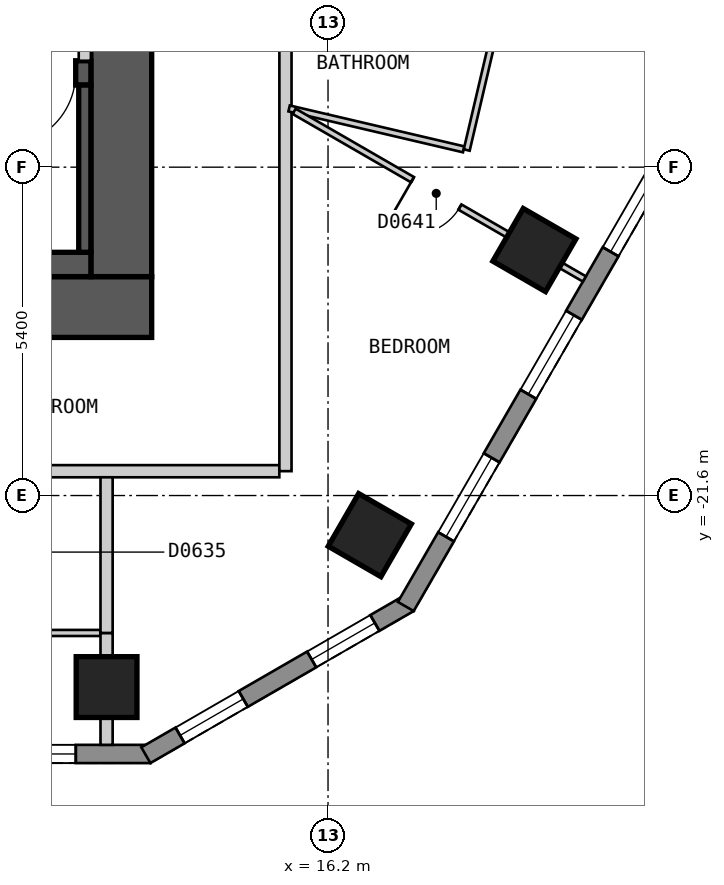
"""IFC4 building model, lengths in metres.
Left out: names, types, materials, properties, quantities, classifications, styles, units other than length and angle.
Written with IfcOpenShell. Run it as: python <this file> out.ifc"""

import sys

from ifc_helpers import new_model, si_unit, direction, frame, frame_2d, origin, origin_2d, place, context, subcontext, project, spatial, polyline, rectangle, outline, extrude, element, fill, save


model = new_model("IFC4")
c1 = context("Model", 3, precision=1e-05, world=origin(), true_north=direction((0.0, 1.0)))
c2 = subcontext(c1, "Body", "Model", "MODEL_VIEW")
j1 = project(units=[si_unit("LENGTHUNIT", "METRE"), si_unit("PLANEANGLEUNIT", "RADIAN")], contexts=[c1])
p1 = place(None, origin())
s1 = spatial("IfcSite", under=j1, at=p1, CompositionType="ELEMENT")
p2 = place(p1, origin())
s2 = spatial("IfcBuilding", under=s1, at=p2, CompositionType="ELEMENT")
p3 = place(p2, frame((0.0, 0.0, 75.0)))
s3 = spatial("IfcBuildingStorey", under=s2, at=p3, CompositionType="ELEMENT", Elevation=75.0)
for number, where, z_axis, x_axis in (
    (1, (12.558, -24.75, 0.0), (0.0, 0.0, 1.0), (1.0, 0.0, 0.0)),
    (2, (16.887, -22.251, 0.0), (0.0, 0.0, 1.0), (0.5, 0.866, 0.0)),
    (3, (19.594, -17.563, 0.0), (0.0, 0.0, 1.0), (0.5, 0.866, 0.0)),
):
    element("IfcColumn", number, at=place(p3, frame(where, z_axis=z_axis, x_axis=x_axis)), inside=s3, PredefinedType="COLUMN", context=c2, shape_type="SweptSolid", body=[
        extrude(rectangle(XDim=1.0, YDim=1.0, at=origin_2d()), origin(), (0.0, 0.0, 1.0), 3.0),
    ])
p4 = place(p3, frame((-13.3, -18.5, 0.0), z_axis=(0.0, 0.0, 1.0), x_axis=(1.0, 0.0, 0.0)))
e4 = element("IfcWall", 4, at=p4, inside=s3, PredefinedType="SHEAR", context=c2, shape_type="SweptSolid", body=[
    extrude(rectangle(XDim=26.6, YDim=1.0, at=frame_2d((13.3, 0.0))), origin(), (0.0, 0.0, 1.0), 2.7),
])
p5 = place(p3, frame((12.8, -18.0, 0.0), z_axis=(0.0, 0.0, 1.0), x_axis=(0.0, 1.0, 0.0)))
e5 = element("IfcWall", 5, at=p5, inside=s3, PredefinedType="SHEAR", context=c2, shape_type="SweptSolid", body=[
    extrude(rectangle(XDim=12.0, YDim=1.0, at=frame_2d((6.0, 0.0))), origin(), (0.0, 0.0, 1.0), 2.7),
])
p6 = place(p3, frame((-12.3, -14.65, 0.0), z_axis=(0.0, 0.0, 1.0), x_axis=(1.0, 0.0, 0.0)))
e6 = element("IfcWall", 6, at=p6, inside=s3, PredefinedType="SHEAR", context=c2, shape_type="SweptSolid", body=[
    extrude(rectangle(XDim=24.6, YDim=0.4, at=frame_2d((12.3, 0.0))), origin(), (0.0, 0.0, 1.0), 2.7),
])
p7 = place(p6, frame((1.5, 0.0, 0.0), z_axis=(0.0, 0.0, 1.0), x_axis=(-1.0, 0.0, 0.0)))
e7 = element("IfcOpeningElement", 7, at=p7, cuts=e6, PredefinedType="OPENING", context=c2, shape_type="SweptSolid", body=[
    extrude(rectangle(XDim=1.2, YDim=2.1, at=frame_2d((0.6, 1.05))), frame((0.0, 0.21, 0.0), z_axis=(0.0, -1.0, 0.0), x_axis=(1.0, 0.0, 0.0)), (0.0, 0.0, 1.0), 0.42),
])
p8 = place(p6, frame((24.35, 0.0, 0.0), z_axis=(0.0, 0.0, 1.0), x_axis=(-1.0, 0.0, 0.0)))
e8 = element("IfcOpeningElement", 8, at=p8, cuts=e6, PredefinedType="OPENING", context=c2, shape_type="SweptSolid", body=[
    extrude(rectangle(XDim=1.2, YDim=2.1, at=frame_2d((0.6, 1.05))), frame((0.0, 0.21, 0.0), z_axis=(0.0, -1.0, 0.0), x_axis=(1.0, 0.0, 0.0)), (0.0, 0.0, 1.0), 0.42),
])
p9 = place(p6, frame((17.4, 0.0, 0.0), z_axis=(0.0, 0.0, 1.0), x_axis=(-1.0, 0.0, 0.0)))
e9 = element("IfcOpeningElement", 9, at=p9, cuts=e6, PredefinedType="OPENING", context=c2, shape_type="SweptSolid", body=[
    extrude(rectangle(XDim=1.0, YDim=2.1, at=frame_2d((0.5, 1.05))), frame((0.0, 0.21, 0.0), z_axis=(0.0, -1.0, 0.0), x_axis=(1.0, 0.0, 0.0)), (0.0, 0.0, 1.0), 0.42),
])
p10 = place(p3, frame((-13.279, -25.85, 0.0), z_axis=(0.0, 0.0, 1.0), x_axis=(1.0, 0.0, 0.0)))
e10 = element("IfcWall", 10, at=p10, inside=s3, PredefinedType="SOLIDWALL", context=c2, shape_type="SweptSolid", body=[
    extrude(outline(polyline([(0.0, -0.15), (26.558, -0.15), (26.478, 0.15), (0.08, 0.15), (0.0, -0.15)])), origin(), (0.0, 0.0, 1.0), 2.7),
])
p11 = place(p10, frame((1.228, 0.0, 0.15)))
e11 = element("IfcOpeningElement", 11, at=p11, cuts=e10, PredefinedType="OPENING", context=c2, shape_type="SweptSolid", body=[
    extrude(rectangle(XDim=1.5, YDim=2.1, at=frame_2d((0.75, 1.05))), frame((0.0, 0.16, 0.0), z_axis=(0.0, -1.0, 0.0), x_axis=(1.0, 0.0, 0.0)), (0.0, 0.0, 1.0), 0.32),
])
p12 = place(p10, frame((3.739, 0.0, 0.15)))
e12 = element("IfcOpeningElement", 12, at=p12, cuts=e10, PredefinedType="OPENING", context=c2, shape_type="SweptSolid", body=[
    extrude(rectangle(XDim=1.5, YDim=2.1, at=frame_2d((0.75, 1.05))), frame((0.0, 0.16, 0.0), z_axis=(0.0, -1.0, 0.0), x_axis=(1.0, 0.0, 0.0)), (0.0, 0.0, 1.0), 0.32),
])
p13 = place(p10, frame((6.251, 0.0, 0.15)))
e13 = element("IfcOpeningElement", 13, at=p13, cuts=e10, PredefinedType="OPENING", context=c2, shape_type="SweptSolid", body=[
    extrude(rectangle(XDim=1.5, YDim=2.1, at=frame_2d((0.75, 1.05))), frame((0.0, 0.16, 0.0), z_axis=(0.0, -1.0, 0.0), x_axis=(1.0, 0.0, 0.0)), (0.0, 0.0, 1.0), 0.32),
])
p14 = place(p10, frame((8.762, 0.0, 0.15)))
e14 = element("IfcOpeningElement", 14, at=p14, cuts=e10, PredefinedType="OPENING", context=c2, shape_type="SweptSolid", body=[
    extrude(rectangle(XDim=1.5, YDim=2.1, at=frame_2d((0.75, 1.05))), frame((0.0, 0.16, 0.0), z_axis=(0.0, -1.0, 0.0), x_axis=(1.0, 0.0, 0.0)), (0.0, 0.0, 1.0), 0.32),
])
p15 = place(p10, frame((11.274, 0.0, 0.15)))
e15 = element("IfcOpeningElement", 15, at=p15, cuts=e10, PredefinedType="OPENING", context=c2, shape_type="SweptSolid", body=[
    extrude(rectangle(XDim=1.5, YDim=2.1, at=frame_2d((0.75, 1.05))), frame((0.0, 0.16, 0.0), z_axis=(0.0, -1.0, 0.0), x_axis=(1.0, 0.0, 0.0)), (0.0, 0.0, 1.0), 0.32),
])
p16 = place(p10, frame((13.785, 0.0, 0.15)))
e16 = element("IfcOpeningElement", 16, at=p16, cuts=e10, PredefinedType="OPENING", context=c2, shape_type="SweptSolid", body=[
    extrude(rectangle(XDim=1.5, YDim=2.1, at=frame_2d((0.75, 1.05))), frame((0.0, 0.16, 0.0), z_axis=(0.0, -1.0, 0.0), x_axis=(1.0, 0.0, 0.0)), (0.0, 0.0, 1.0), 0.32),
])
p17 = place(p10, frame((16.297, 0.0, 0.15)))
e17 = element("IfcOpeningElement", 17, at=p17, cuts=e10, PredefinedType="OPENING", context=c2, shape_type="SweptSolid", body=[
    extrude(rectangle(XDim=1.5, YDim=2.1, at=frame_2d((0.75, 1.05))), frame((0.0, 0.16, 0.0), z_axis=(0.0, -1.0, 0.0), x_axis=(1.0, 0.0, 0.0)), (0.0, 0.0, 1.0), 0.32),
])
p18 = place(p10, frame((18.808, 0.0, 0.15)))
e18 = element("IfcOpeningElement", 18, at=p18, cuts=e10, PredefinedType="OPENING", context=c2, shape_type="SweptSolid", body=[
    extrude(rectangle(XDim=1.5, YDim=2.1, at=frame_2d((0.75, 1.05))), frame((0.0, 0.16, 0.0), z_axis=(0.0, -1.0, 0.0), x_axis=(1.0, 0.0, 0.0)), (0.0, 0.0, 1.0), 0.32),
])
p19 = place(p10, frame((21.32, 0.0, 0.15)))
e19 = element("IfcOpeningElement", 19, at=p19, cuts=e10, PredefinedType="OPENING", context=c2, shape_type="SweptSolid", body=[
    extrude(rectangle(XDim=1.5, YDim=2.1, at=frame_2d((0.75, 1.05))), frame((0.0, 0.16, 0.0), z_axis=(0.0, -1.0, 0.0), x_axis=(1.0, 0.0, 0.0)), (0.0, 0.0, 1.0), 0.32),
])
p20 = place(p10, frame((23.831, 0.0, 0.15)))
e20 = element("IfcOpeningElement", 20, at=p20, cuts=e10, PredefinedType="OPENING", context=c2, shape_type="SweptSolid", body=[
    extrude(rectangle(XDim=1.5, YDim=2.1, at=frame_2d((0.75, 1.05))), frame((0.0, 0.16, 0.0), z_axis=(0.0, -1.0, 0.0), x_axis=(1.0, 0.0, 0.0)), (0.0, 0.0, 1.0), 0.32),
])
p21 = place(p3, frame((13.204, -25.87, 0.0), z_axis=(0.0, 0.0, 1.0), x_axis=(0.866010750942, 0.50002537861, 0.0)))
e21 = element("IfcWall", 21, at=p21, inside=s3, PredefinedType="SOLIDWALL", context=c2, shape_type="SweptSolid", body=[
    extrude(outline(polyline([(0.0, -0.15), (5.0, -0.15), (4.919, 0.15), (0.08, 0.15), (0.0, -0.15)])), origin(), (0.0, 0.0, 1.0), 2.7),
])
p22 = place(p21, frame((0.65, 0.0, 0.15)))
e22 = element("IfcOpeningElement", 22, at=p22, cuts=e21, PredefinedType="OPENING", context=c2, shape_type="SweptSolid", body=[
    extrude(rectangle(XDim=1.2, YDim=2.1, at=frame_2d((0.6, 1.05))), frame((0.0, 0.16, 0.0), z_axis=(0.0, -1.0, 0.0), x_axis=(1.0, 0.0, 0.0)), (0.0, 0.0, 1.0), 0.32),
])
p23 = place(p21, frame((3.149, 0.0, 0.15)))
e23 = element("IfcOpeningElement", 23, at=p23, cuts=e21, PredefinedType="OPENING", context=c2, shape_type="SweptSolid", body=[
    extrude(rectangle(XDim=1.2, YDim=2.1, at=frame_2d((0.6, 1.05))), frame((0.0, 0.16, 0.0), z_axis=(0.0, -1.0, 0.0), x_axis=(1.0, 0.0, 0.0)), (0.0, 0.0, 1.0), 0.32),
])
p24 = place(p3, frame((17.479, -23.425, 0.0), z_axis=(0.0, 0.0, 1.0), x_axis=(0.500035407905, 0.866004960056, 0.0)))
e24 = element("IfcWall", 24, at=p24, inside=s3, PredefinedType="SOLIDWALL", context=c2, shape_type="SweptSolid", body=[
    extrude(outline(polyline([(0.0, -0.15), (23.094, -0.15), (23.014, 0.15), (0.08, 0.15), (0.0, -0.15)])), origin(), (0.0, 0.0, 1.0), 2.7),
])
p25 = place(p24, frame((1.324, 0.0, 0.15)))
e25 = element("IfcOpeningElement", 25, at=p25, cuts=e24, PredefinedType="OPENING", context=c2, shape_type="SweptSolid", body=[
    extrude(rectangle(XDim=1.5, YDim=2.1, at=frame_2d((0.75, 1.05))), frame((0.0, 0.16, 0.0), z_axis=(0.0, -1.0, 0.0), x_axis=(1.0, 0.0, 0.0)), (0.0, 0.0, 1.0), 0.32),
])
p26 = place(p24, frame((4.031, 0.0, 0.15)))
e26 = element("IfcOpeningElement", 26, at=p26, cuts=e24, PredefinedType="OPENING", context=c2, shape_type="SweptSolid", body=[
    extrude(rectangle(XDim=1.5, YDim=2.1, at=frame_2d((0.75, 1.05))), frame((0.0, 0.16, 0.0), z_axis=(0.0, -1.0, 0.0), x_axis=(1.0, 0.0, 0.0)), (0.0, 0.0, 1.0), 0.32),
])
p27 = place(p24, frame((6.737, 0.0, 0.15)))
e27 = element("IfcOpeningElement", 27, at=p27, cuts=e24, PredefinedType="OPENING", context=c2, shape_type="SweptSolid", body=[
    extrude(rectangle(XDim=1.5, YDim=2.1, at=frame_2d((0.75, 1.05))), frame((0.0, 0.16, 0.0), z_axis=(0.0, -1.0, 0.0), x_axis=(1.0, 0.0, 0.0)), (0.0, 0.0, 1.0), 0.32),
])
p28 = place(p24, frame((9.444, 0.0, 0.15)))
e28 = element("IfcOpeningElement", 28, at=p28, cuts=e24, PredefinedType="OPENING", context=c2, shape_type="SweptSolid", body=[
    extrude(rectangle(XDim=1.5, YDim=2.1, at=frame_2d((0.75, 1.05))), frame((0.0, 0.16, 0.0), z_axis=(0.0, -1.0, 0.0), x_axis=(1.0, 0.0, 0.0)), (0.0, 0.0, 1.0), 0.32),
])
p29 = place(p24, frame((12.151, 0.0, 0.15)))
e29 = element("IfcOpeningElement", 29, at=p29, cuts=e24, PredefinedType="OPENING", context=c2, shape_type="SweptSolid", body=[
    extrude(rectangle(XDim=1.5, YDim=2.1, at=frame_2d((0.75, 1.05))), frame((0.0, 0.16, 0.0), z_axis=(0.0, -1.0, 0.0), x_axis=(1.0, 0.0, 0.0)), (0.0, 0.0, 1.0), 0.32),
])
p30 = place(p24, frame((14.857, 0.0, 0.15)))
e30 = element("IfcOpeningElement", 30, at=p30, cuts=e24, PredefinedType="OPENING", context=c2, shape_type="SweptSolid", body=[
    extrude(rectangle(XDim=1.5, YDim=2.1, at=frame_2d((0.75, 1.05))), frame((0.0, 0.16, 0.0), z_axis=(0.0, -1.0, 0.0), x_axis=(1.0, 0.0, 0.0)), (0.0, 0.0, 1.0), 0.32),
])
p31 = place(p24, frame((17.564, 0.0, 0.15)))
e31 = element("IfcOpeningElement", 31, at=p31, cuts=e24, PredefinedType="OPENING", context=c2, shape_type="SweptSolid", body=[
    extrude(rectangle(XDim=1.5, YDim=2.1, at=frame_2d((0.75, 1.05))), frame((0.0, 0.16, 0.0), z_axis=(0.0, -1.0, 0.0), x_axis=(1.0, 0.0, 0.0)), (0.0, 0.0, 1.0), 0.32),
])
p32 = place(p24, frame((20.271, 0.0, 0.15)))
e32 = element("IfcOpeningElement", 32, at=p32, cuts=e24, PredefinedType="OPENING", context=c2, shape_type="SweptSolid", body=[
    extrude(rectangle(XDim=1.5, YDim=2.1, at=frame_2d((0.75, 1.05))), frame((0.0, 0.16, 0.0), z_axis=(0.0, -1.0, 0.0), x_axis=(1.0, 0.0, 0.0)), (0.0, 0.0, 1.0), 0.32),
])
p33 = place(p3, frame((-15.499, -21.2, 0.0), z_axis=(0.0, 0.0, 1.0), x_axis=(1.0, 0.0, 0.0)))
e33 = element("IfcWall", 33, at=p33, inside=s3, PredefinedType="PARTITIONING", context=c2, shape_type="SweptSolid", body=[
    extrude(rectangle(XDim=30.898, YDim=0.2, at=frame_2d((15.449, 0.0))), origin(), (0.0, 0.0, 1.0), 2.7),
])
p34 = place(p33, frame((4.954, 0.0, 0.0)))
e34 = element("IfcOpeningElement", 34, at=p34, cuts=e33, PredefinedType="OPENING", context=c2, shape_type="SweptSolid", body=[
    extrude(rectangle(XDim=1.0, YDim=2.1, at=frame_2d((0.5, 1.05))), frame((0.0, 0.11, 0.0), z_axis=(0.0, -1.0, 0.0), x_axis=(1.0, 0.0, 0.0)), (0.0, 0.0, 1.0), 0.22),
])
p35 = place(p33, frame((25.046, 0.0, 0.0)))
e35 = element("IfcOpeningElement", 35, at=p35, cuts=e33, PredefinedType="OPENING", context=c2, shape_type="SweptSolid", body=[
    extrude(rectangle(XDim=1.0, YDim=2.1, at=frame_2d((0.5, 1.05))), frame((0.0, 0.11, 0.0), z_axis=(0.0, -1.0, 0.0), x_axis=(1.0, 0.0, 0.0)), (0.0, 0.0, 1.0), 0.22),
])
p36 = place(p3, frame((15.5, -21.199, 0.0), z_axis=(0.0, 0.0, 1.0), x_axis=(0.0, 1.0, 0.0)))
e36 = element("IfcWall", 36, at=p36, inside=s3, PredefinedType="PARTITIONING", context=c2, shape_type="SweptSolid", body=[
    extrude(rectangle(XDim=10.483, YDim=0.2, at=frame_2d((5.241, 0.0))), origin(), (0.0, 0.0, 1.0), 2.7),
])
p37 = place(p36, frame((8.376, 0.0, 0.0)))
e37 = element("IfcOpeningElement", 37, at=p37, cuts=e36, PredefinedType="OPENING", context=c2, shape_type="SweptSolid", body=[
    extrude(rectangle(XDim=1.0, YDim=2.1, at=frame_2d((0.5, 1.05))), frame((0.0, 0.11, 0.0), z_axis=(0.0, -1.0, 0.0), x_axis=(1.0, 0.0, 0.0)), (0.0, 0.0, 1.0), 0.22),
])
p38 = place(p3, frame((15.56, -15.234, 0.0), z_axis=(0.0, 0.0, 1.0), x_axis=(0.973598200068, -0.228268580457, 0.0)))
e38 = element("IfcWall", 38, at=p38, inside=s3, PredefinedType="PARTITIONING", context=c2, shape_type="SweptSolid", body=[
    extrude(rectangle(XDim=2.949, YDim=0.1, at=frame_2d((1.474, 0.0))), origin(), (0.0, 0.0, 1.0), 2.7),
])
p39 = place(p3, frame((15.643, -15.282, 0.0), z_axis=(0.0, 0.0, 1.0), x_axis=(0.865990833325, -0.500059873013, 0.0)))
e39 = element("IfcWall", 39, at=p39, inside=s3, PredefinedType="PARTITIONING", context=c2, shape_type="SweptSolid", body=[
    extrude(rectangle(XDim=5.511, YDim=0.1, at=frame_2d((2.756, 0.0))), origin(), (0.0, 0.0, 1.0), 2.7),
])
p40 = place(p39, frame((2.248, 0.0, 0.0)))
e40 = element("IfcOpeningElement", 40, at=p40, cuts=e39, PredefinedType="OPENING", context=c2, shape_type="SweptSolid", body=[
    extrude(rectangle(XDim=0.9, YDim=2.1, at=frame_2d((0.45, 1.05))), frame((0.0, 0.06, 0.0), z_axis=(0.0, -1.0, 0.0), x_axis=(1.0, 0.0, 0.0)), (0.0, 0.0, 1.0), 0.12),
])
p41 = place(p3, frame((9.294, -23.86, 0.0), z_axis=(0.0, 0.0, 1.0), x_axis=(1.0, 0.0, 0.0)))
e41 = element("IfcWall", 41, at=p41, inside=s3, PredefinedType="PARTITIONING", context=c2, shape_type="SweptSolid", body=[
    extrude(rectangle(XDim=3.164, YDim=0.1, at=frame_2d((1.582, 0.0))), origin(), (0.0, 0.0, 1.0), 2.7),
])
p42 = place(p3, frame((18.481, -15.918, 0.0), z_axis=(0.0, 0.0, 1.0), x_axis=(0.228391116115, 0.97356946238, 0.0)))
e42 = element("IfcWall", 42, at=p42, inside=s3, PredefinedType="PARTITIONING", context=c2, shape_type="SweptSolid", body=[
    extrude(rectangle(XDim=3.674, YDim=0.1, at=frame_2d((1.837, 0.0))), origin(), (0.0, 0.0, 1.0), 2.7),
])
p43 = place(p3, frame((12.558, -23.86, 0.0), z_axis=(0.0, 0.0, 1.0), x_axis=(0.0, -1.0, 0.0)))
e43 = element("IfcWall", 43, at=p43, inside=s3, PredefinedType="PARTITIONING", context=c2, shape_type="SweptSolid", body=[
    extrude(rectangle(XDim=1.84, YDim=0.2, at=frame_2d((0.92, 0.0))), origin(), (0.0, 0.0, 1.0), 2.7),
])
p44 = place(p3, frame((12.558, -23.86, 0.0), z_axis=(0.0, 0.0, 1.0), x_axis=(0.0, 1.0, 0.0)))
e44 = element("IfcWall", 44, at=p44, inside=s3, PredefinedType="PARTITIONING", context=c2, shape_type="SweptSolid", body=[
    extrude(rectangle(XDim=2.56, YDim=0.2, at=frame_2d((1.28, 0.0))), origin(), (0.0, 0.0, 1.0), 2.7),
])
p45 = place(p3, frame((6.7, -17.8, 0.0), z_axis=(0.0, 0.0, 1.0), x_axis=(1.0, 0.0, 0.0)))
e45 = element("IfcWall", 45, at=p45, inside=s3, PredefinedType="SOLIDWALL", context=c2, shape_type="SweptSolid", body=[
    extrude(rectangle(XDim=5.6, YDim=0.4, at=frame_2d((2.8, 0.0))), origin(), (0.0, 0.0, 1.0), 2.7),
])
p46 = place(p3, frame((12.2, -17.6, 0.0), z_axis=(0.0, 0.0, 1.0), x_axis=(0.0, 1.0, 0.0)))
e46 = element("IfcWall", 46, at=p46, inside=s3, PredefinedType="SOLIDWALL", context=c2, shape_type="SweptSolid", body=[
    extrude(rectangle(XDim=2.75, YDim=0.2, at=frame_2d((1.375, 0.0))), origin(), (0.0, 0.0, 1.0), 2.7),
])
p47 = place(p3, frame((12.2, -14.45, 0.0), z_axis=(0.0, 0.0, 1.0), x_axis=(0.0, 1.0, 0.0)))
e47 = element("IfcWall", 47, at=p47, inside=s3, PredefinedType="PARTITIONING", context=c2, shape_type="SweptSolid", body=[
    extrude(rectangle(XDim=8.25, YDim=0.2, at=frame_2d((4.125, 0.0))), origin(), (0.0, 0.0, 1.0), 2.7),
])
p48 = place(p20, origin())
e48 = element("IfcWindow", 48, at=p48, inside=s3, PartitioningType="SINGLE_PANEL", PredefinedType="WINDOW", context=c2, shape_type="SweptSolid", body=[
    extrude(rectangle(XDim=1.5, YDim=2.1, at=frame_2d((0.75, 1.05))), frame((0.0, 0.03, 0.0), z_axis=(0.0, -1.0, 0.0), x_axis=(1.0, 0.0, 0.0)), (0.0, 0.0, 1.0), 0.06),
])
fill(e20, e48)
p49 = place(p22, origin())
e49 = element("IfcWindow", 49, at=p49, inside=s3, PartitioningType="SINGLE_PANEL", PredefinedType="WINDOW", context=c2, shape_type="SweptSolid", body=[
    extrude(rectangle(XDim=1.2, YDim=2.1, at=frame_2d((0.6, 1.05))), frame((0.0, 0.03, 0.0), z_axis=(0.0, -1.0, 0.0), x_axis=(1.0, 0.0, 0.0)), (0.0, 0.0, 1.0), 0.06),
])
fill(e22, e49)
p50 = place(p23, origin())
e50 = element("IfcWindow", 50, at=p50, inside=s3, PartitioningType="SINGLE_PANEL", PredefinedType="WINDOW", context=c2, shape_type="SweptSolid", body=[
    extrude(rectangle(XDim=1.2, YDim=2.1, at=frame_2d((0.6, 1.05))), frame((0.0, 0.03, 0.0), z_axis=(0.0, -1.0, 0.0), x_axis=(1.0, 0.0, 0.0)), (0.0, 0.0, 1.0), 0.06),
])
fill(e23, e50)
p51 = place(p25, origin())
e51 = element("IfcWindow", 51, at=p51, inside=s3, PartitioningType="SINGLE_PANEL", PredefinedType="WINDOW", context=c2, shape_type="SweptSolid", body=[
    extrude(rectangle(XDim=1.5, YDim=2.1, at=frame_2d((0.75, 1.05))), frame((0.0, 0.03, 0.0), z_axis=(0.0, -1.0, 0.0), x_axis=(1.0, 0.0, 0.0)), (0.0, 0.0, 1.0), 0.06),
])
fill(e25, e51)
p52 = place(p26, origin())
e52 = element("IfcWindow", 52, at=p52, inside=s3, PartitioningType="SINGLE_PANEL", PredefinedType="WINDOW", context=c2, shape_type="SweptSolid", body=[
    extrude(rectangle(XDim=1.5, YDim=2.1, at=frame_2d((0.75, 1.05))), frame((0.0, 0.03, 0.0), z_axis=(0.0, -1.0, 0.0), x_axis=(1.0, 0.0, 0.0)), (0.0, 0.0, 1.0), 0.06),
])
fill(e26, e52)
p53 = place(p27, origin())
e53 = element("IfcWindow", 53, at=p53, inside=s3, PartitioningType="SINGLE_PANEL", PredefinedType="WINDOW", context=c2, shape_type="SweptSolid", body=[
    extrude(rectangle(XDim=1.5, YDim=2.1, at=frame_2d((0.75, 1.05))), frame((0.0, 0.03, 0.0), z_axis=(0.0, -1.0, 0.0), x_axis=(1.0, 0.0, 0.0)), (0.0, 0.0, 1.0), 0.06),
])
fill(e27, e53)
p54 = place(p40, origin())
e54 = element("IfcDoor", 54, at=p54, inside=s3, OperationType="SINGLE_SWING_LEFT", PredefinedType="DOOR", context=c2, shape_type="SweptSolid", body=[
    extrude(rectangle(XDim=0.9, YDim=2.1, at=frame_2d((0.45, 1.05))), frame((0.0, 0.025, 0.0), z_axis=(0.0, -1.0, 0.0), x_axis=(1.0, 0.0, 0.0)), (0.0, 0.0, 1.0), 0.05),
])
fill(e40, e54)
p55 = place(p8, origin())
e55 = element("IfcDoor", 55, at=p55, inside=s3, OperationType="SINGLE_SWING_RIGHT", PredefinedType="DOOR", context=c2, shape_type="SweptSolid", body=[
    extrude(rectangle(XDim=1.2, YDim=2.1, at=frame_2d((0.6, 1.05))), frame((0.0, 0.025, 0.0), z_axis=(0.0, -1.0, 0.0), x_axis=(1.0, 0.0, 0.0)), (0.0, 0.0, 1.0), 0.05),
])
fill(e8, e55)
save(model, sys.argv[1])
